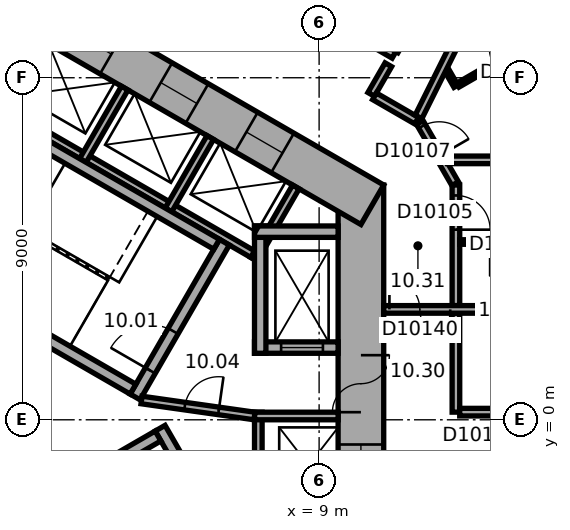
"""IFC4 building model, lengths in metres.
Left out: names, types, materials, properties, quantities, classifications, styles, units other than length and angle.
Written with IfcOpenShell. Run it as: python <this file> out.ifc"""

import sys

from ifc_helpers import new_model, si_unit, direction, frame, frame_2d, origin, place, context, subcontext, project, spatial, rectangle, extrude, element, fill, save


model = new_model("IFC4")
c1 = context("Model", 3, precision=1e-05, world=origin(), true_north=direction((0.0, 1.0)))
c2 = subcontext(c1, "Body", "Model", "MODEL_VIEW")
j1 = project(units=[si_unit("LENGTHUNIT", "METRE"), si_unit("PLANEANGLEUNIT", "RADIAN")], contexts=[c1])
p1 = place(None, origin())
s1 = spatial("IfcSite", under=j1, at=p1, CompositionType="ELEMENT")
p2 = place(p1, origin())
s2 = spatial("IfcBuilding", under=s1, at=p2, CompositionType="ELEMENT")
p3 = place(p2, frame((0.0, 0.0, 53.9)))
s3 = spatial("IfcBuildingStorey", under=s2, at=p3, CompositionType="ELEMENT", Elevation=53.9)
p4 = place(p3, frame((10.1, -6.177, 0.0), z_axis=(0.0, 0.0, 1.0), x_axis=(0.0, 1.0, 0.0)))
e1 = element("IfcWall", 1, at=p4, inside=s3, PredefinedType="SHEAR", context=c2, shape_type="SweptSolid", body=[
    extrude(rectangle(XDim=12.355, YDim=1.2, at=frame_2d((6.177, 0.0))), origin(), (0.0, 0.0, 1.0), 3.3),
])
p5 = place(p4, frame((6.378, 0.0, 0.0)))
e2 = element("IfcOpeningElement", 2, at=p5, cuts=e1, PredefinedType="OPENING", context=c2, shape_type="SweptSolid", body=[
    extrude(rectangle(XDim=1.5, YDim=2.1, at=frame_2d((0.75, 1.05))), frame((0.0, 0.61, 0.0), z_axis=(0.0, -1.0, 0.0), x_axis=(1.0, 0.0, 0.0)), (0.0, 0.0, 1.0), 1.22),
])
p6 = place(p4, frame((1.828, 0.0, 0.0)))
e3 = element("IfcOpeningElement", 3, at=p6, cuts=e1, PredefinedType="OPENING", context=c2, shape_type="SweptSolid", body=[
    extrude(rectangle(XDim=1.1, YDim=2.1, at=frame_2d((0.55, 1.05))), frame((0.0, 0.61, 0.0), z_axis=(0.0, -1.0, 0.0), x_axis=(1.0, 0.0, 0.0)), (0.0, 0.0, 1.0), 1.22),
])
p7 = place(p4, frame((4.427, 0.0, 0.0)))
e4 = element("IfcOpeningElement", 4, at=p7, cuts=e1, PredefinedType="OPENING", context=c2, shape_type="SweptSolid", body=[
    extrude(rectangle(XDim=1.1, YDim=2.1, at=frame_2d((0.55, 1.05))), frame((0.0, 0.61, 0.0), z_axis=(0.0, -1.0, 0.0), x_axis=(1.0, 0.0, 0.0)), (0.0, 0.0, 1.0), 1.22),
])
p8 = place(p3, frame((10.4, 5.658, 0.0), z_axis=(0.0, 0.0, 1.0), x_axis=(-0.866021384402, 0.500006961711, 0.0)))
e5 = element("IfcWall", 5, at=p8, inside=s3, PredefinedType="SHEAR", context=c2, shape_type="SweptSolid", body=[
    extrude(rectangle(XDim=12.355, YDim=1.2, at=frame_2d((6.178, 0.0))), origin(), (0.0, 0.0, 1.0), 3.3),
])
p9 = place(p8, frame((2.728, 0.0, 0.0)))
e6 = element("IfcOpeningElement", 6, at=p9, cuts=e5, PredefinedType="OPENING", context=c2, shape_type="SweptSolid", body=[
    extrude(rectangle(XDim=1.1, YDim=2.1, at=frame_2d((0.55, 1.05))), frame((0.0, 0.61, 0.0), z_axis=(0.0, -1.0, 0.0), x_axis=(1.0, 0.0, 0.0)), (0.0, 0.0, 1.0), 1.22),
])
p10 = place(p8, frame((5.328, 0.0, 0.0)))
e7 = element("IfcOpeningElement", 7, at=p10, cuts=e5, PredefinedType="OPENING", context=c2, shape_type="SweptSolid", body=[
    extrude(rectangle(XDim=1.1, YDim=2.1, at=frame_2d((0.55, 1.05))), frame((0.0, 0.61, 0.0), z_axis=(0.0, -1.0, 0.0), x_axis=(1.0, 0.0, 0.0)), (0.0, 0.0, 1.0), 1.22),
])
p11 = place(p8, frame((7.928, 0.0, 0.0)))
e8 = element("IfcOpeningElement", 8, at=p11, cuts=e5, PredefinedType="OPENING", context=c2, shape_type="SweptSolid", body=[
    extrude(rectangle(XDim=1.1, YDim=2.1, at=frame_2d((0.55, 1.05))), frame((0.0, 0.61, 0.0), z_axis=(0.0, -1.0, 0.0), x_axis=(1.0, 0.0, 0.0)), (0.0, 0.0, 1.0), 1.22),
])
p12 = place(p3, frame((7.4, -5.2, 0.0), z_axis=(0.0, 0.0, 1.0), x_axis=(0.0, 1.0, 0.0)))
e9 = element("IfcWall", 9, at=p12, inside=s3, PredefinedType="PARTITIONING", context=c2, shape_type="SweptSolid", body=[
    extrude(rectangle(XDim=5.4, YDim=0.2, at=frame_2d((2.7, 0.0))), origin(), (0.0, 0.0, 1.0), 3.05),
])
p13 = place(p3, frame((7.3, 0.1, 0.0), z_axis=(0.0, 0.0, 1.0), x_axis=(1.0, 0.0, 0.0)))
e10 = element("IfcWall", 10, at=p13, inside=s3, PredefinedType="PARTITIONING", context=c2, shape_type="SweptSolid", body=[
    extrude(rectangle(XDim=2.2, YDim=0.2, at=frame_2d((1.1, 0.0))), origin(), (0.0, 0.0, 1.0), 3.05),
])
p14 = place(p3, frame((7.424, 4.259, 0.0), z_axis=(0.0, 0.0, 1.0), x_axis=(-0.866026010844, 0.49999894854, 0.0)))
e11 = element("IfcWall", 11, at=p14, inside=s3, PredefinedType="PARTITIONING", context=c2, shape_type="SweptSolid", body=[
    extrude(rectangle(XDim=8.0, YDim=0.2, at=frame_2d((4.0, 0.0))), origin(), (0.0, 0.0, 1.0), 3.05),
])
for number, where, z_axis, x_axis in (
    (12, (7.287, 4.222, 0.0), (0.0, 0.0, 1.0), (0.5, 0.866, 0.0)),
    (13, (5.036, 5.522, 0.0), (0.0, 0.0, 1.0), (0.5, 0.866, 0.0)),
    (14, (2.784, 6.822, 0.0), (0.0, 0.0, 1.0), (0.5, 0.866, 0.0)),
):
    element("IfcWall", number, at=place(p3, frame(where, z_axis=z_axis, x_axis=x_axis)), inside=s3, PredefinedType="PARTITIONING", context=c2, shape_type="SweptSolid", body=[
        extrude(rectangle(XDim=2.2, YDim=0.2, at=frame_2d((1.1, 0.0))), origin(), (0.0, 0.0, 1.0), 3.05),
    ])
p15 = place(p3, frame((4.158, 0.602, 0.0), z_axis=(0.0, 0.0, 1.0), x_axis=(0.499977259774, 0.866038532462, 0.0)))
e15 = element("IfcWall", 15, at=p15, inside=s3, PredefinedType="SHEAR", context=c2, shape_type="SweptSolid", body=[
    extrude(rectangle(XDim=4.7, YDim=0.3, at=frame_2d((2.35, 0.0))), origin(), (0.0, 0.0, 1.0), 3.05),
])
p16 = place(p15, frame((0.8, 0.0, 0.0)))
e16 = element("IfcOpeningElement", 16, at=p16, cuts=e15, PredefinedType="OPENING", context=c2, shape_type="SweptSolid", body=[
    extrude(rectangle(XDim=1.2, YDim=2.1, at=frame_2d((0.6, 1.05))), frame((0.0, 0.16, 0.0), z_axis=(0.0, -1.0, 0.0), x_axis=(1.0, 0.0, 0.0)), (0.0, 0.0, 1.0), 0.32),
])
for number, where, z_axis, x_axis in (
    (17, (4.103, 0.807, 0.0), (0.0, 0.0, 1.0), (-0.866, 0.5, 0.0)),
    (18, (6.303, 4.617, 0.0), (0.0, 0.0, 1.0), (-0.866, 0.5, 0.0)),
):
    element("IfcWall", number, at=place(p3, frame(where, z_axis=z_axis, x_axis=x_axis)), inside=s3, PredefinedType="SHEAR", context=c2, shape_type="SweptSolid", body=[
        extrude(rectangle(XDim=7.06, YDim=0.3, at=frame_2d((3.53, 0.0))), origin(), (0.0, 0.0, 1.0), 3.05),
    ])
p17 = place(p3, frame((4.816, -0.222, 0.0), z_axis=(0.0, 0.0, 1.0), x_axis=(0.499977259774, -0.866038532462, 0.0)))
e19 = element("IfcWall", 19, at=p17, inside=s3, PredefinedType="SHEAR", context=c2, shape_type="SweptSolid", body=[
    extrude(rectangle(XDim=4.7, YDim=0.3, at=frame_2d((2.35, 0.0))), origin(), (0.0, 0.0, 1.0), 3.05),
])
p18 = place(p3, frame((-1.353, -3.957, 0.0), z_axis=(0.0, 0.0, 1.0), x_axis=(0.866027801685, 0.499995846692, 0.0)))
e20 = element("IfcWall", 20, at=p18, inside=s3, PredefinedType="SHEAR", context=c2, shape_type="SweptSolid", body=[
    extrude(rectangle(XDim=7.06, YDim=0.3, at=frame_2d((3.53, 0.0))), origin(), (0.0, 0.0, 1.0), 3.05),
])
p19 = place(p3, frame((7.3, 1.9, 0.0), z_axis=(0.0, 0.0, 1.0), x_axis=(1.0, 0.0, 0.0)))
e21 = element("IfcWall", 21, at=p19, inside=s3, PredefinedType="SHEAR", context=c2, shape_type="SweptSolid", body=[
    extrude(rectangle(XDim=2.2, YDim=0.3, at=frame_2d((1.1, 0.0))), origin(), (0.0, 0.0, 1.0), 3.05),
])
p20 = place(p19, frame((0.7, 0.0, 0.0)))
e22 = element("IfcOpeningElement", 22, at=p20, cuts=e21, PredefinedType="OPENING", context=c2, shape_type="SweptSolid", body=[
    extrude(rectangle(XDim=1.1, YDim=2.1, at=frame_2d((0.55, 1.05))), frame((0.0, 0.16, 0.0), z_axis=(0.0, -1.0, 0.0), x_axis=(1.0, 0.0, 0.0)), (0.0, 0.0, 1.0), 0.32),
])
p21 = place(p3, frame((7.45, 1.75, 0.0), z_axis=(0.0, 0.0, 1.0), x_axis=(0.0, 1.0, 0.0)))
e23 = element("IfcWall", 23, at=p21, inside=s3, PredefinedType="SHEAR", context=c2, shape_type="SweptSolid", body=[
    extrude(rectangle(XDim=3.35, YDim=0.3, at=frame_2d((1.675, 0.0))), origin(), (0.0, 0.0, 1.0), 3.05),
])
p22 = place(p3, frame((7.3, 4.95, 0.0), z_axis=(0.0, 0.0, 1.0), x_axis=(1.0, 0.0, 0.0)))
e24 = element("IfcWall", 24, at=p22, inside=s3, PredefinedType="SHEAR", context=c2, shape_type="SweptSolid", body=[
    extrude(rectangle(XDim=2.2, YDim=0.3, at=frame_2d((1.1, 0.0))), origin(), (0.0, 0.0, 1.0), 3.05),
])
p23 = place(p3, frame((4.327, 0.521, 0.0), z_axis=(0.0, 0.0, 1.0), x_axis=(0.990124376366, -0.14019172346, 0.0)))
e25 = element("IfcWall", 25, at=p23, inside=s3, PredefinedType="PARTITIONING", context=c2, shape_type="SweptSolid", body=[
    extrude(rectangle(XDim=3.002, YDim=0.2, at=frame_2d((1.501, 0.0))), origin(), (0.0, 0.0, 1.0), 3.05),
])
p24 = place(p23, frame((1.15, 0.0, 0.0)))
e26 = element("IfcOpeningElement", 26, at=p24, cuts=e25, PredefinedType="OPENING", context=c2, shape_type="SweptSolid", body=[
    extrude(rectangle(XDim=0.9, YDim=2.1, at=frame_2d((0.45, 1.05))), frame((0.0, 0.11, 0.0), z_axis=(0.0, -1.0, 0.0), x_axis=(1.0, 0.0, 0.0)), (0.0, 0.0, 1.0), 0.22),
])
p25 = place(p3, frame((10.371, 8.561, 0.0), z_axis=(0.0, 0.0, 1.0), x_axis=(0.50004290449, 0.866000631449, 0.0)))
e27 = element("IfcWall", 27, at=p25, inside=s3, PredefinedType="PARTITIONING", context=c2, shape_type="SweptSolid", body=[
    extrude(rectangle(XDim=0.901, YDim=0.2, at=frame_2d((0.451, 0.0))), origin(), (0.0, 0.0, 1.0), 3.05),
])
p26 = place(p3, frame((10.972, 9.602, 0.0), z_axis=(0.0, 0.0, 1.0), x_axis=(-0.866033277307, 0.499986362411, 0.0)))
e28 = element("IfcWall", 28, at=p26, inside=s3, PredefinedType="PARTITIONING", context=c2, shape_type="SweptSolid", body=[
    extrude(rectangle(XDim=8.702, YDim=0.2, at=frame_2d((4.351, 0.0))), origin(), (0.0, 0.0, 1.0), 3.05),
])
p27 = place(p26, frame((4.364, 0.0, 0.0)))
e29 = element("IfcOpeningElement", 29, at=p27, cuts=e28, PredefinedType="OPENING", context=c2, shape_type="SweptSolid", body=[
    extrude(rectangle(XDim=0.9, YDim=2.1, at=frame_2d((0.45, 1.05))), frame((0.0, 0.11, 0.0), z_axis=(0.0, -1.0, 0.0), x_axis=(1.0, 0.0, 0.0)), (0.0, 0.0, 1.0), 0.22),
])
p28 = place(p3, frame((11.566, 7.871, 0.0), z_axis=(0.0, 0.0, 1.0), x_axis=(-0.866004557827, 0.500036104519, 0.0)))
e30 = element("IfcWall", 30, at=p28, inside=s3, PredefinedType="PARTITIONING", context=c2, shape_type="SweptSolid", body=[
    extrude(rectangle(XDim=1.28, YDim=0.2, at=frame_2d((0.64, 0.0))), origin(), (0.0, 0.0, 1.0), 3.05),
])
p29 = place(p3, frame((12.442, 12.148, 0.0), z_axis=(0.0, 0.0, 1.0), x_axis=(-0.49994816717, -0.866055327414, 0.0)))
e31 = element("IfcWall", 31, at=p29, inside=s3, PredefinedType="PARTITIONING", context=c2, shape_type="SweptSolid", body=[
    extrude(rectangle(XDim=2.84, YDim=0.12, at=frame_2d((1.42, 0.0))), origin(), (0.0, 0.0, 1.0), 3.05),
])
p30 = place(p3, frame((12.58, 6.212, 0.0), z_axis=(0.0, 0.0, 1.0), x_axis=(-0.500063286585, 0.865988862174, 0.0)))
e32 = element("IfcWall", 32, at=p30, inside=s3, PredefinedType="PARTITIONING", context=c2, shape_type="SweptSolid", body=[
    extrude(rectangle(XDim=1.86, YDim=0.2, at=frame_2d((0.93, 0.0))), origin(), (0.0, 0.0, 1.0), 3.05),
])
p31 = place(p30, frame((0.842, 0.0, 0.0)))
e33 = element("IfcOpeningElement", 33, at=p31, cuts=e32, PredefinedType="OPENING", context=c2, shape_type="SweptSolid", body=[
    extrude(rectangle(XDim=0.9, YDim=2.1, at=frame_2d((0.45, 1.05))), frame((0.0, 0.11, 0.0), z_axis=(0.0, -1.0, 0.0), x_axis=(1.0, 0.0, 0.0)), (0.0, 0.0, 1.0), 0.22),
])
p32 = place(p3, frame((12.6, 0.201, 0.0), z_axis=(0.0, 0.0, 1.0), x_axis=(0.0, 1.0, 0.0)))
e34 = element("IfcWall", 34, at=p32, inside=s3, PredefinedType="PARTITIONING", context=c2, shape_type="SweptSolid", body=[
    extrude(rectangle(XDim=2.604, YDim=0.2, at=frame_2d((1.302, 0.0))), origin(), (0.0, 0.0, 1.0), 3.05),
])
p33 = place(p3, frame((12.6, 3.004, 0.0), z_axis=(0.0, 0.0, 1.0), x_axis=(0.0, 1.0, 0.0)))
e35 = element("IfcWall", 35, at=p33, inside=s3, PredefinedType="PARTITIONING", context=c2, shape_type="SweptSolid", body=[
    extrude(rectangle(XDim=3.173, YDim=0.2, at=frame_2d((1.586, 0.0))), origin(), (0.0, 0.0, 1.0), 3.05),
])
p34 = place(p33, frame((1.998, 0.0, 0.0)))
e36 = element("IfcOpeningElement", 36, at=p34, cuts=e35, PredefinedType="OPENING", context=c2, shape_type="SweptSolid", body=[
    extrude(rectangle(XDim=0.9, YDim=2.1, at=frame_2d((0.45, 1.05))), frame((0.0, 0.11, 0.0), z_axis=(0.0, -1.0, 0.0), x_axis=(1.0, 0.0, 0.0)), (0.0, 0.0, 1.0), 0.22),
])
p35 = place(p3, frame((12.601, 8.776, 0.0), z_axis=(0.0, 0.0, 1.0), x_axis=(-0.500166486798, 0.865929261247, 0.0)))
e37 = element("IfcWall", 37, at=p35, inside=s3, PredefinedType="PARTITIONING", context=c2, shape_type="SweptSolid", body=[
    extrude(rectangle(XDim=0.476, YDim=0.12, at=frame_2d((0.238, 0.0))), origin(), (0.0, 0.0, 1.0), 3.05),
])
p36 = place(p3, frame((12.7, 4.677, 0.0), z_axis=(0.0, 0.0, 1.0), x_axis=(1.0, 0.0, 0.0)))
e38 = element("IfcWall", 38, at=p36, inside=s3, PredefinedType="PARTITIONING", context=c2, shape_type="SweptSolid", body=[
    extrude(rectangle(XDim=2.5, YDim=0.12, at=frame_2d((1.25, 0.0))), origin(), (0.0, 0.0, 1.0), 3.05),
])
p37 = place(p36, frame((0.8, 0.0, 0.0)))
e39 = element("IfcOpeningElement", 39, at=p37, cuts=e38, PredefinedType="OPENING", context=c2, shape_type="SweptSolid", body=[
    extrude(rectangle(XDim=0.9, YDim=2.1, at=frame_2d((0.45, 1.05))), frame((0.0, 0.07, 0.0), z_axis=(0.0, -1.0, 0.0), x_axis=(1.0, 0.0, 0.0)), (0.0, 0.0, 1.0), 0.14),
])
p38 = place(p3, frame((13.701, 0.201, 0.0), z_axis=(0.0, 0.0, 1.0), x_axis=(-1.0, 0.0, 0.0)))
e40 = element("IfcWall", 40, at=p38, inside=s3, PredefinedType="PARTITIONING", context=c2, shape_type="SweptSolid", body=[
    extrude(rectangle(XDim=1.001, YDim=0.2, at=frame_2d((0.5, 0.0))), origin(), (0.0, 0.0, 1.0), 3.05),
])
p39 = place(p3, frame((14.974, 10.146, 0.0), z_axis=(0.0, 0.0, 1.0), x_axis=(-0.86599746015, -0.500048396672, 0.0)))
e41 = element("IfcWall", 41, at=p39, inside=s3, PredefinedType="PARTITIONING", context=c2, shape_type="SweptSolid", body=[
    extrude(rectangle(XDim=2.68, YDim=0.12, at=frame_2d((1.34, 0.0))), origin(), (0.0, 0.0, 1.0), 3.05),
])
p40 = place(p39, frame((0.69, 0.0, 0.0)))
e42 = element("IfcOpeningElement", 42, at=p40, cuts=e41, PredefinedType="OPENING", context=c2, shape_type="SweptSolid", body=[
    extrude(rectangle(XDim=0.9, YDim=2.1, at=frame_2d((0.45, 1.05))), frame((0.0, 0.07, 0.0), z_axis=(0.0, -1.0, 0.0), x_axis=(1.0, 0.0, 0.0)), (0.0, 0.0, 1.0), 0.14),
])
p41 = place(p3, frame((15.915, 16.592, 0.0), z_axis=(0.0, 0.0, 1.0), x_axis=(-0.446199736347, -0.894933402709, 0.0)))
e43 = element("IfcWall", 43, at=p41, inside=s3, PredefinedType="PARTITIONING", context=c2, shape_type="SweptSolid", body=[
    extrude(rectangle(XDim=9.635, YDim=0.2, at=frame_2d((4.817, 0.0))), origin(), (0.0, 0.0, 1.0), 3.05),
])
p42 = place(p3, frame((21.95, 2.905, 0.0), z_axis=(0.0, 0.0, 1.0), x_axis=(-1.0, 0.0, 0.0)))
e44 = element("IfcWall", 44, at=p42, inside=s3, PredefinedType="PARTITIONING", context=c2, shape_type="SweptSolid", body=[
    extrude(rectangle(XDim=11.25, YDim=0.2, at=frame_2d((5.625, 0.0))), origin(), (0.0, 0.0, 1.0), 3.05),
])
p43 = place(p42, frame((9.5, 0.0, 0.0)))
e45 = element("IfcOpeningElement", 45, at=p43, cuts=e44, PredefinedType="OPENING", context=c2, shape_type="SweptSolid", body=[
    extrude(rectangle(XDim=1.6, YDim=2.1, at=frame_2d((0.8, 1.05))), frame((0.0, 0.11, 0.0), z_axis=(0.0, -1.0, 0.0), x_axis=(1.0, 0.0, 0.0)), (0.0, 0.0, 1.0), 0.22),
])
p44 = place(p3, frame((21.95, 6.839, 0.0), z_axis=(0.0, 0.0, 1.0), x_axis=(-1.0, 0.0, 0.0)))
e46 = element("IfcWall", 46, at=p44, inside=s3, PredefinedType="PARTITIONING", context=c2, shape_type="SweptSolid", body=[
    extrude(rectangle(XDim=9.572, YDim=0.2, at=frame_2d((4.786, 0.0))), origin(), (0.0, 0.0, 1.0), 3.05),
])
p45 = place(p5, origin())
e47 = element("IfcDoor", 47, at=p45, inside=s3, OperationType="DOUBLE_DOOR_SINGLE_SWING", PredefinedType="DOOR", context=c2, shape_type="SweptSolid", body=[
    extrude(rectangle(XDim=1.5, YDim=2.1, at=frame_2d((0.75, 1.05))), frame((0.0, 0.025, 0.0), z_axis=(0.0, -1.0, 0.0), x_axis=(1.0, 0.0, 0.0)), (0.0, 0.0, 1.0), 0.05),
])
fill(e2, e47)
p46 = place(p16, origin())
e48 = element("IfcDoor", 48, at=p46, inside=s3, OperationType="SINGLE_SWING_RIGHT", PredefinedType="DOOR", context=c2, shape_type="SweptSolid", body=[
    extrude(rectangle(XDim=1.2, YDim=2.1, at=frame_2d((0.6, 1.05))), frame((0.0, 0.025, 0.0), z_axis=(0.0, -1.0, 0.0), x_axis=(1.0, 0.0, 0.0)), (0.0, 0.0, 1.0), 0.05),
])
fill(e16, e48)
p47 = place(p24, origin())
e49 = element("IfcDoor", 49, at=p47, inside=s3, OperationType="SINGLE_SWING_LEFT", PredefinedType="DOOR", context=c2, shape_type="SweptSolid", body=[
    extrude(rectangle(XDim=0.9, YDim=2.1, at=frame_2d((0.45, 1.05))), frame((0.0, 0.025, 0.0), z_axis=(0.0, -1.0, 0.0), x_axis=(1.0, 0.0, 0.0)), (0.0, 0.0, 1.0), 0.05),
])
fill(e26, e49)
p48 = place(p20, origin())
e50 = element("IfcDoor", 50, at=p48, inside=s3, OperationType="DOUBLE_DOOR_SLIDING", PredefinedType="DOOR", context=c2, shape_type="SweptSolid", body=[
    extrude(rectangle(XDim=1.1, YDim=2.1, at=frame_2d((0.55, 1.05))), frame((0.0, 0.025, 0.0), z_axis=(0.0, -1.0, 0.0), x_axis=(1.0, 0.0, 0.0)), (0.0, 0.0, 1.0), 0.05),
])
fill(e22, e50)
p49 = place(p7, origin())
e51 = element("IfcDoor", 51, at=p49, inside=s3, OperationType="DOUBLE_DOOR_SLIDING", PredefinedType="DOOR", context=c2, shape_type="SweptSolid", body=[
    extrude(rectangle(XDim=1.1, YDim=2.1, at=frame_2d((0.55, 1.05))), frame((0.0, 0.025, 0.0), z_axis=(0.0, -1.0, 0.0), x_axis=(1.0, 0.0, 0.0)), (0.0, 0.0, 1.0), 0.05),
])
fill(e4, e51)
p50 = place(p9, origin())
e52 = element("IfcDoor", 52, at=p50, inside=s3, OperationType="DOUBLE_DOOR_SLIDING", PredefinedType="DOOR", context=c2, shape_type="SweptSolid", body=[
    extrude(rectangle(XDim=1.1, YDim=2.1, at=frame_2d((0.55, 1.05))), frame((0.0, 0.025, 0.0), z_axis=(0.0, -1.0, 0.0), x_axis=(1.0, 0.0, 0.0)), (0.0, 0.0, 1.0), 0.05),
])
fill(e6, e52)
p51 = place(p10, origin())
e53 = element("IfcDoor", 53, at=p51, inside=s3, OperationType="DOUBLE_DOOR_SLIDING", PredefinedType="DOOR", context=c2, shape_type="SweptSolid", body=[
    extrude(rectangle(XDim=1.1, YDim=2.1, at=frame_2d((0.55, 1.05))), frame((0.0, 0.025, 0.0), z_axis=(0.0, -1.0, 0.0), x_axis=(1.0, 0.0, 0.0)), (0.0, 0.0, 1.0), 0.05),
])
fill(e7, e53)
p52 = place(p11, origin())
e54 = element("IfcDoor", 54, at=p52, inside=s3, OperationType="DOUBLE_DOOR_SLIDING", PredefinedType="DOOR", context=c2, shape_type="SweptSolid", body=[
    extrude(rectangle(XDim=1.1, YDim=2.1, at=frame_2d((0.55, 1.05))), frame((0.0, 0.025, 0.0), z_axis=(0.0, -1.0, 0.0), x_axis=(1.0, 0.0, 0.0)), (0.0, 0.0, 1.0), 0.05),
])
fill(e8, e54)
p53 = place(p34, origin())
e55 = element("IfcDoor", 55, at=p53, inside=s3, OperationType="SINGLE_SWING_LEFT", PredefinedType="DOOR", context=c2, shape_type="SweptSolid", body=[
    extrude(rectangle(XDim=0.9, YDim=2.1, at=frame_2d((0.45, 1.05))), frame((0.0, 0.025, 0.0), z_axis=(0.0, -1.0, 0.0), x_axis=(1.0, 0.0, 0.0)), (0.0, 0.0, 1.0), 0.05),
])
fill(e36, e55)
p54 = place(p31, origin())
e56 = element("IfcDoor", 56, at=p54, inside=s3, OperationType="SINGLE_SWING_LEFT", PredefinedType="DOOR", context=c2, shape_type="SweptSolid", body=[
    extrude(rectangle(XDim=0.9, YDim=2.1, at=frame_2d((0.45, 1.05))), frame((0.0, 0.025, 0.0), z_axis=(0.0, -1.0, 0.0), x_axis=(1.0, 0.0, 0.0)), (0.0, 0.0, 1.0), 0.05),
])
fill(e33, e56)
p55 = place(p43, origin())
e57 = element("IfcDoor", 57, at=p55, inside=s3, OperationType="DOUBLE_DOOR_SINGLE_SWING", PredefinedType="DOOR", context=c2, shape_type="SweptSolid", body=[
    extrude(rectangle(XDim=1.6, YDim=2.1, at=frame_2d((0.8, 1.05))), frame((0.0, 0.025, 0.0), z_axis=(0.0, -1.0, 0.0), x_axis=(1.0, 0.0, 0.0)), (0.0, 0.0, 1.0), 0.05),
])
fill(e45, e57)
save(model, sys.argv[1])
